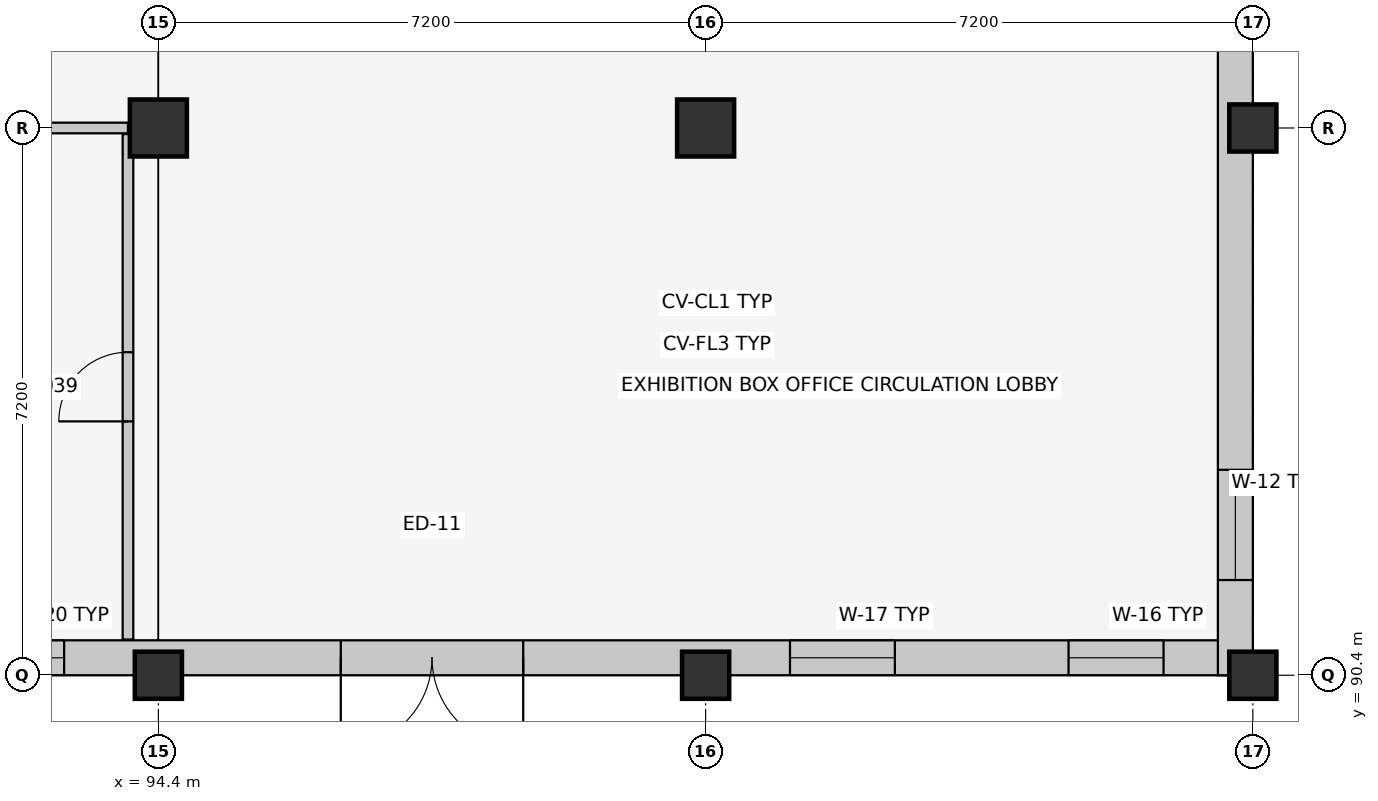
"""IFC4 building model, lengths in metres.
Left out: names, types, materials, properties, quantities, classifications, styles, units other than length and angle.
Written with IfcOpenShell. Run it as: python <this file> out.ifc"""

import sys

from ifc_helpers import new_model, si_unit, direction, frame, frame_2d, origin, origin_2d, place, context, subcontext, project, spatial, rectangle, circle, extrude, element, fill, save


model = new_model("IFC4")
c1 = context("Model", 3, precision=1e-05, world=origin(), true_north=direction((0.0, 1.0)))
c2 = subcontext(c1, "Body", "Model", "MODEL_VIEW")
j1 = project(units=[si_unit("LENGTHUNIT", "METRE"), si_unit("PLANEANGLEUNIT", "RADIAN")], contexts=[c1])
p1 = place(None, origin())
s1 = spatial("IfcSite", under=j1, at=p1, CompositionType="ELEMENT")
p2 = place(p1, origin())
s2 = spatial("IfcBuilding", under=s1, at=p2, CompositionType="ELEMENT")
p3 = place(p2, origin())
s3 = spatial("IfcBuildingStorey", under=s2, at=p3, CompositionType="ELEMENT", Elevation=0.0)
p4 = place(p3, frame((94.4, 90.4, 0.0), z_axis=(0.0, 0.0, 1.0), x_axis=(1.0, 0.0, 0.0)))
e1 = element("IfcColumn", 1, at=p4, inside=s3, PredefinedType="COLUMN", context=c2, shape_type="SweptSolid", body=[
    extrude(rectangle(XDim=0.62, YDim=0.62, at=origin_2d()), origin(), (0.0, 0.0, 1.0), 5.4),
])
p5 = place(p3, frame((94.4, 97.6, 0.0), z_axis=(0.0, 0.0, 1.0), x_axis=(1.0, 0.0, 0.0)))
e2 = element("IfcColumn", 2, at=p5, inside=s3, PredefinedType="COLUMN", context=c2, shape_type="SweptSolid", body=[
    extrude(circle(Radius=0.375, at=origin_2d()), origin(), (0.0, 0.0, 1.0), 5.4),
])
p6 = place(p3, frame((101.6, 90.4, 0.0), z_axis=(0.0, 0.0, 1.0), x_axis=(1.0, 0.0, 0.0)))
e3 = element("IfcColumn", 3, at=p6, inside=s3, PredefinedType="COLUMN", context=c2, shape_type="SweptSolid", body=[
    extrude(rectangle(XDim=0.62, YDim=0.62, at=origin_2d()), origin(), (0.0, 0.0, 1.0), 5.4),
])
p7 = place(p3, frame((101.6, 97.6, 0.0), z_axis=(0.0, 0.0, 1.0), x_axis=(1.0, 0.0, 0.0)))
e4 = element("IfcColumn", 4, at=p7, inside=s3, PredefinedType="COLUMN", context=c2, shape_type="SweptSolid", body=[
    extrude(circle(Radius=0.375, at=origin_2d()), origin(), (0.0, 0.0, 1.0), 5.4),
])
for number, where, z_axis, x_axis in (
    (5, (108.8, 90.4, 0.0), (0.0, 0.0, 1.0), (1.0, 0.0, 0.0)),
    (6, (108.8, 97.6, 0.0), (0.0, 0.0, 1.0), (1.0, 0.0, 0.0)),
):
    element("IfcColumn", number, at=place(p3, frame(where, z_axis=z_axis, x_axis=x_axis)), inside=s3, PredefinedType="COLUMN", context=c2, shape_type="SweptSolid", body=[
        extrude(rectangle(XDim=0.62, YDim=0.62, at=origin_2d()), origin(), (0.0, 0.0, 1.0), 5.4),
    ])
p8 = place(p3, frame((108.8, 90.63, 0.0), z_axis=(0.0, 0.0, 1.0), x_axis=(-1.0, 0.0, 0.0)))
e7 = element("IfcWall", 7, at=p8, inside=s3, PredefinedType="SOLIDWALL", context=c2, shape_type="SweptSolid", body=[
    extrude(rectangle(XDim=43.2, YDim=0.46, at=frame_2d((21.6, 0.0))), origin(), (0.0, 0.0, 1.0), 4.415),
])
p9 = place(p8, frame((9.6, 0.0, 0.0)))
e8 = element("IfcOpeningElement", 8, at=p9, cuts=e7, PredefinedType="OPENING", context=c2, shape_type="SweptSolid", body=[
    extrude(rectangle(XDim=2.4, YDim=2.4, at=frame_2d((1.2, 1.2))), frame((0.0, 0.242, 0.0), z_axis=(0.0, -1.0, 0.0), x_axis=(1.0, 0.0, 0.0)), (0.0, 0.0, 1.0), 0.484),
])
p10 = place(p8, frame((1.175, 0.0, 0.9)))
e9 = element("IfcOpeningElement", 9, at=p10, cuts=e7, PredefinedType="OPENING", context=c2, shape_type="SweptSolid", body=[
    extrude(rectangle(XDim=1.25, YDim=1.6, at=frame_2d((0.625, 0.8))), frame((0.0, 0.242, 0.0), z_axis=(0.0, -1.0, 0.0), x_axis=(1.0, 0.0, 0.0)), (0.0, 0.0, 1.0), 0.484),
])
p11 = place(p8, frame((4.71, 0.0, 0.9)))
e10 = element("IfcOpeningElement", 10, at=p11, cuts=e7, PredefinedType="OPENING", context=c2, shape_type="SweptSolid", body=[
    extrude(rectangle(XDim=1.38, YDim=1.6, at=frame_2d((0.69, 0.8))), frame((0.0, 0.242, 0.0), z_axis=(0.0, -1.0, 0.0), x_axis=(1.0, 0.0, 0.0)), (0.0, 0.0, 1.0), 0.484),
])
p12 = place(p8, frame((15.64, 0.0, 0.9)))
e11 = element("IfcOpeningElement", 11, at=p12, cuts=e7, PredefinedType="OPENING", context=c2, shape_type="SweptSolid", body=[
    extrude(rectangle(XDim=1.12, YDim=1.75, at=frame_2d((0.56, 0.875))), frame((0.0, 0.242, 0.0), z_axis=(0.0, -1.0, 0.0), x_axis=(1.0, 0.0, 0.0)), (0.0, 0.0, 1.0), 0.484),
])
p13 = place(p8, frame((19.18, 0.0, 0.9)))
e12 = element("IfcOpeningElement", 12, at=p13, cuts=e7, PredefinedType="OPENING", context=c2, shape_type="SweptSolid", body=[
    extrude(rectangle(XDim=1.24, YDim=1.75, at=frame_2d((0.62, 0.875))), frame((0.0, 0.242, 0.0), z_axis=(0.0, -1.0, 0.0), x_axis=(1.0, 0.0, 0.0)), (0.0, 0.0, 1.0), 0.484),
])
p14 = place(p8, frame((26.28, 0.0, 0.9)))
e13 = element("IfcOpeningElement", 13, at=p14, cuts=e7, PredefinedType="OPENING", context=c2, shape_type="SweptSolid", body=[
    extrude(rectangle(XDim=1.44, YDim=1.75, at=frame_2d((0.72, 0.875))), frame((0.0, 0.242, 0.0), z_axis=(0.0, -1.0, 0.0), x_axis=(1.0, 0.0, 0.0)), (0.0, 0.0, 1.0), 0.484),
])
p15 = place(p8, frame((29.85, 0.0, 0.9)))
e14 = element("IfcOpeningElement", 14, at=p15, cuts=e7, PredefinedType="OPENING", context=c2, shape_type="SweptSolid", body=[
    extrude(rectangle(XDim=1.5, YDim=1.75, at=frame_2d((0.75, 0.875))), frame((0.0, 0.242, 0.0), z_axis=(0.0, -1.0, 0.0), x_axis=(1.0, 0.0, 0.0)), (0.0, 0.0, 1.0), 0.484),
])
p16 = place(p8, frame((33.75, 0.0, 0.9)))
e15 = element("IfcOpeningElement", 15, at=p16, cuts=e7, PredefinedType="OPENING", context=c2, shape_type="SweptSolid", body=[
    extrude(rectangle(XDim=0.9, YDim=1.35, at=frame_2d((0.45, 0.675))), frame((0.0, 0.242, 0.0), z_axis=(0.0, -1.0, 0.0), x_axis=(1.0, 0.0, 0.0)), (0.0, 0.0, 1.0), 0.484),
])
p17 = place(p8, frame((40.85, 0.0, 0.9)))
e16 = element("IfcOpeningElement", 16, at=p17, cuts=e7, PredefinedType="OPENING", context=c2, shape_type="SweptSolid", body=[
    extrude(rectangle(XDim=1.1, YDim=1.35, at=frame_2d((0.55, 0.675))), frame((0.0, 0.242, 0.0), z_axis=(0.0, -1.0, 0.0), x_axis=(1.0, 0.0, 0.0)), (0.0, 0.0, 1.0), 0.484),
])
p18 = place(p3, frame((108.57, 126.0, 0.0), z_axis=(0.0, 0.0, 1.0), x_axis=(0.0, -1.0, 0.0)))
e17 = element("IfcWall", 17, at=p18, inside=s3, PredefinedType="SOLIDWALL", context=c2, shape_type="SweptSolid", body=[
    extrude(rectangle(XDim=35.6, YDim=0.46, at=frame_2d((17.8, 0.0))), origin(), (0.0, 0.0, 1.0), 4.515),
])
p19 = place(p18, frame((1.378, 0.0, 0.9)))
e18 = element("IfcOpeningElement", 18, at=p19, cuts=e17, PredefinedType="OPENING", context=c2, shape_type="SweptSolid", body=[
    extrude(rectangle(XDim=1.2, YDim=1.35, at=frame_2d((0.6, 0.675))), frame((0.0, 0.242, 0.0), z_axis=(0.0, -1.0, 0.0), x_axis=(1.0, 0.0, 0.0)), (0.0, 0.0, 1.0), 0.484),
])
p20 = place(p18, frame((9.189, 0.0, 0.9)))
e19 = element("IfcOpeningElement", 19, at=p20, cuts=e17, PredefinedType="OPENING", context=c2, shape_type="SweptSolid", body=[
    extrude(rectangle(XDim=1.4, YDim=1.35, at=frame_2d((0.7, 0.675))), frame((0.0, 0.242, 0.0), z_axis=(0.0, -1.0, 0.0), x_axis=(1.0, 0.0, 0.0)), (0.0, 0.0, 1.0), 0.484),
])
p21 = place(p18, frame((17.275, 0.0, 0.9)))
e20 = element("IfcOpeningElement", 20, at=p21, cuts=e17, PredefinedType="OPENING", context=c2, shape_type="SweptSolid", body=[
    extrude(rectangle(XDim=1.05, YDim=1.45, at=frame_2d((0.525, 0.725))), frame((0.0, 0.242, 0.0), z_axis=(0.0, -1.0, 0.0), x_axis=(1.0, 0.0, 0.0)), (0.0, 0.0, 1.0), 0.484),
])
p22 = place(p18, frame((32.897, 0.0, 0.9)))
e21 = element("IfcOpeningElement", 21, at=p22, cuts=e17, PredefinedType="OPENING", context=c2, shape_type="SweptSolid", body=[
    extrude(rectangle(XDim=1.45, YDim=1.45, at=frame_2d((0.725, 0.725))), frame((0.0, 0.242, 0.0), z_axis=(0.0, -1.0, 0.0), x_axis=(1.0, 0.0, 0.0)), (0.0, 0.0, 1.0), 0.484),
])
p23 = place(p3, frame((90.78, 97.6, 0.0), z_axis=(0.0, 0.0, 1.0), x_axis=(1.0, 0.0, 0.0)))
e22 = element("IfcWall", 22, at=p23, inside=s3, PredefinedType="PARTITIONING", context=c2, shape_type="SweptSolid", body=[
    extrude(rectangle(XDim=3.22, YDim=0.14, at=frame_2d((1.61, 0.0))), origin(), (0.0, 0.0, 1.0), 4.345),
])
p24 = place(p3, frame((94.0, 90.87, 0.0), z_axis=(0.0, 0.0, 1.0), x_axis=(0.0, 1.0, 0.0)))
e23 = element("IfcWall", 23, at=p24, inside=s3, PredefinedType="PARTITIONING", context=c2, shape_type="SweptSolid", body=[
    extrude(rectangle(XDim=6.65, YDim=0.14, at=frame_2d((3.325, 0.0))), origin(), (0.0, 0.0, 1.0), 5.12),
])
p25 = place(p24, frame((2.87, 0.0, 0.0)))
e24 = element("IfcOpeningElement", 24, at=p25, cuts=e23, PredefinedType="OPENING", context=c2, shape_type="SweptSolid", body=[
    extrude(rectangle(XDim=0.91, YDim=2.06, at=frame_2d((0.455, 1.03))), frame((0.0, 0.082, 0.0), z_axis=(0.0, -1.0, 0.0), x_axis=(1.0, 0.0, 0.0)), (0.0, 0.0, 1.0), 0.164),
])
p26 = place(p9, origin())
e25 = element("IfcDoor", 25, at=p26, inside=s3, OperationType="DOUBLE_DOOR_SINGLE_SWING", PredefinedType="DOOR", context=c2, shape_type="SweptSolid", body=[
    extrude(rectangle(XDim=2.4, YDim=2.4, at=frame_2d((1.2, 1.2))), frame((0.0, 0.025, 0.0), z_axis=(0.0, -1.0, 0.0), x_axis=(1.0, 0.0, 0.0)), (0.0, 0.0, 1.0), 0.05),
])
fill(e8, e25)
p27 = place(p10, origin())
e26 = element("IfcWindow", 26, at=p27, inside=s3, PartitioningType="SINGLE_PANEL", PredefinedType="WINDOW", context=c2, shape_type="SweptSolid", body=[
    extrude(rectangle(XDim=1.25, YDim=1.6, at=frame_2d((0.625, 0.8))), frame((0.0, 0.03, 0.0), z_axis=(0.0, -1.0, 0.0), x_axis=(1.0, 0.0, 0.0)), (0.0, 0.0, 1.0), 0.06),
])
fill(e9, e26)
p28 = place(p11, origin())
e27 = element("IfcWindow", 27, at=p28, inside=s3, PartitioningType="SINGLE_PANEL", PredefinedType="WINDOW", context=c2, shape_type="SweptSolid", body=[
    extrude(rectangle(XDim=1.38, YDim=1.6, at=frame_2d((0.69, 0.8))), frame((0.0, 0.03, 0.0), z_axis=(0.0, -1.0, 0.0), x_axis=(1.0, 0.0, 0.0)), (0.0, 0.0, 1.0), 0.06),
])
fill(e10, e27)
p29 = place(p12, origin())
e28 = element("IfcWindow", 28, at=p29, inside=s3, PartitioningType="SINGLE_PANEL", PredefinedType="WINDOW", context=c2, shape_type="SweptSolid", body=[
    extrude(rectangle(XDim=1.12, YDim=1.75, at=frame_2d((0.56, 0.875))), frame((0.0, 0.03, 0.0), z_axis=(0.0, -1.0, 0.0), x_axis=(1.0, 0.0, 0.0)), (0.0, 0.0, 1.0), 0.06),
])
fill(e11, e28)
p30 = place(p22, origin())
e29 = element("IfcWindow", 29, at=p30, inside=s3, PartitioningType="SINGLE_PANEL", PredefinedType="WINDOW", context=c2, shape_type="SweptSolid", body=[
    extrude(rectangle(XDim=1.45, YDim=1.45, at=frame_2d((0.725, 0.725))), frame((0.0, 0.03, 0.0), z_axis=(0.0, -1.0, 0.0), x_axis=(1.0, 0.0, 0.0)), (0.0, 0.0, 1.0), 0.06),
])
fill(e21, e29)
p31 = place(p25, origin())
e30 = element("IfcDoor", 30, at=p31, inside=s3, OperationType="SINGLE_SWING_LEFT", PredefinedType="DOOR", context=c2, shape_type="SweptSolid", body=[
    extrude(rectangle(XDim=0.91, YDim=2.06, at=frame_2d((0.455, 1.03))), frame((0.0, 0.025, 0.0), z_axis=(0.0, -1.0, 0.0), x_axis=(1.0, 0.0, 0.0)), (0.0, 0.0, 1.0), 0.05),
])
fill(e24, e30)
save(model, sys.argv[1])
